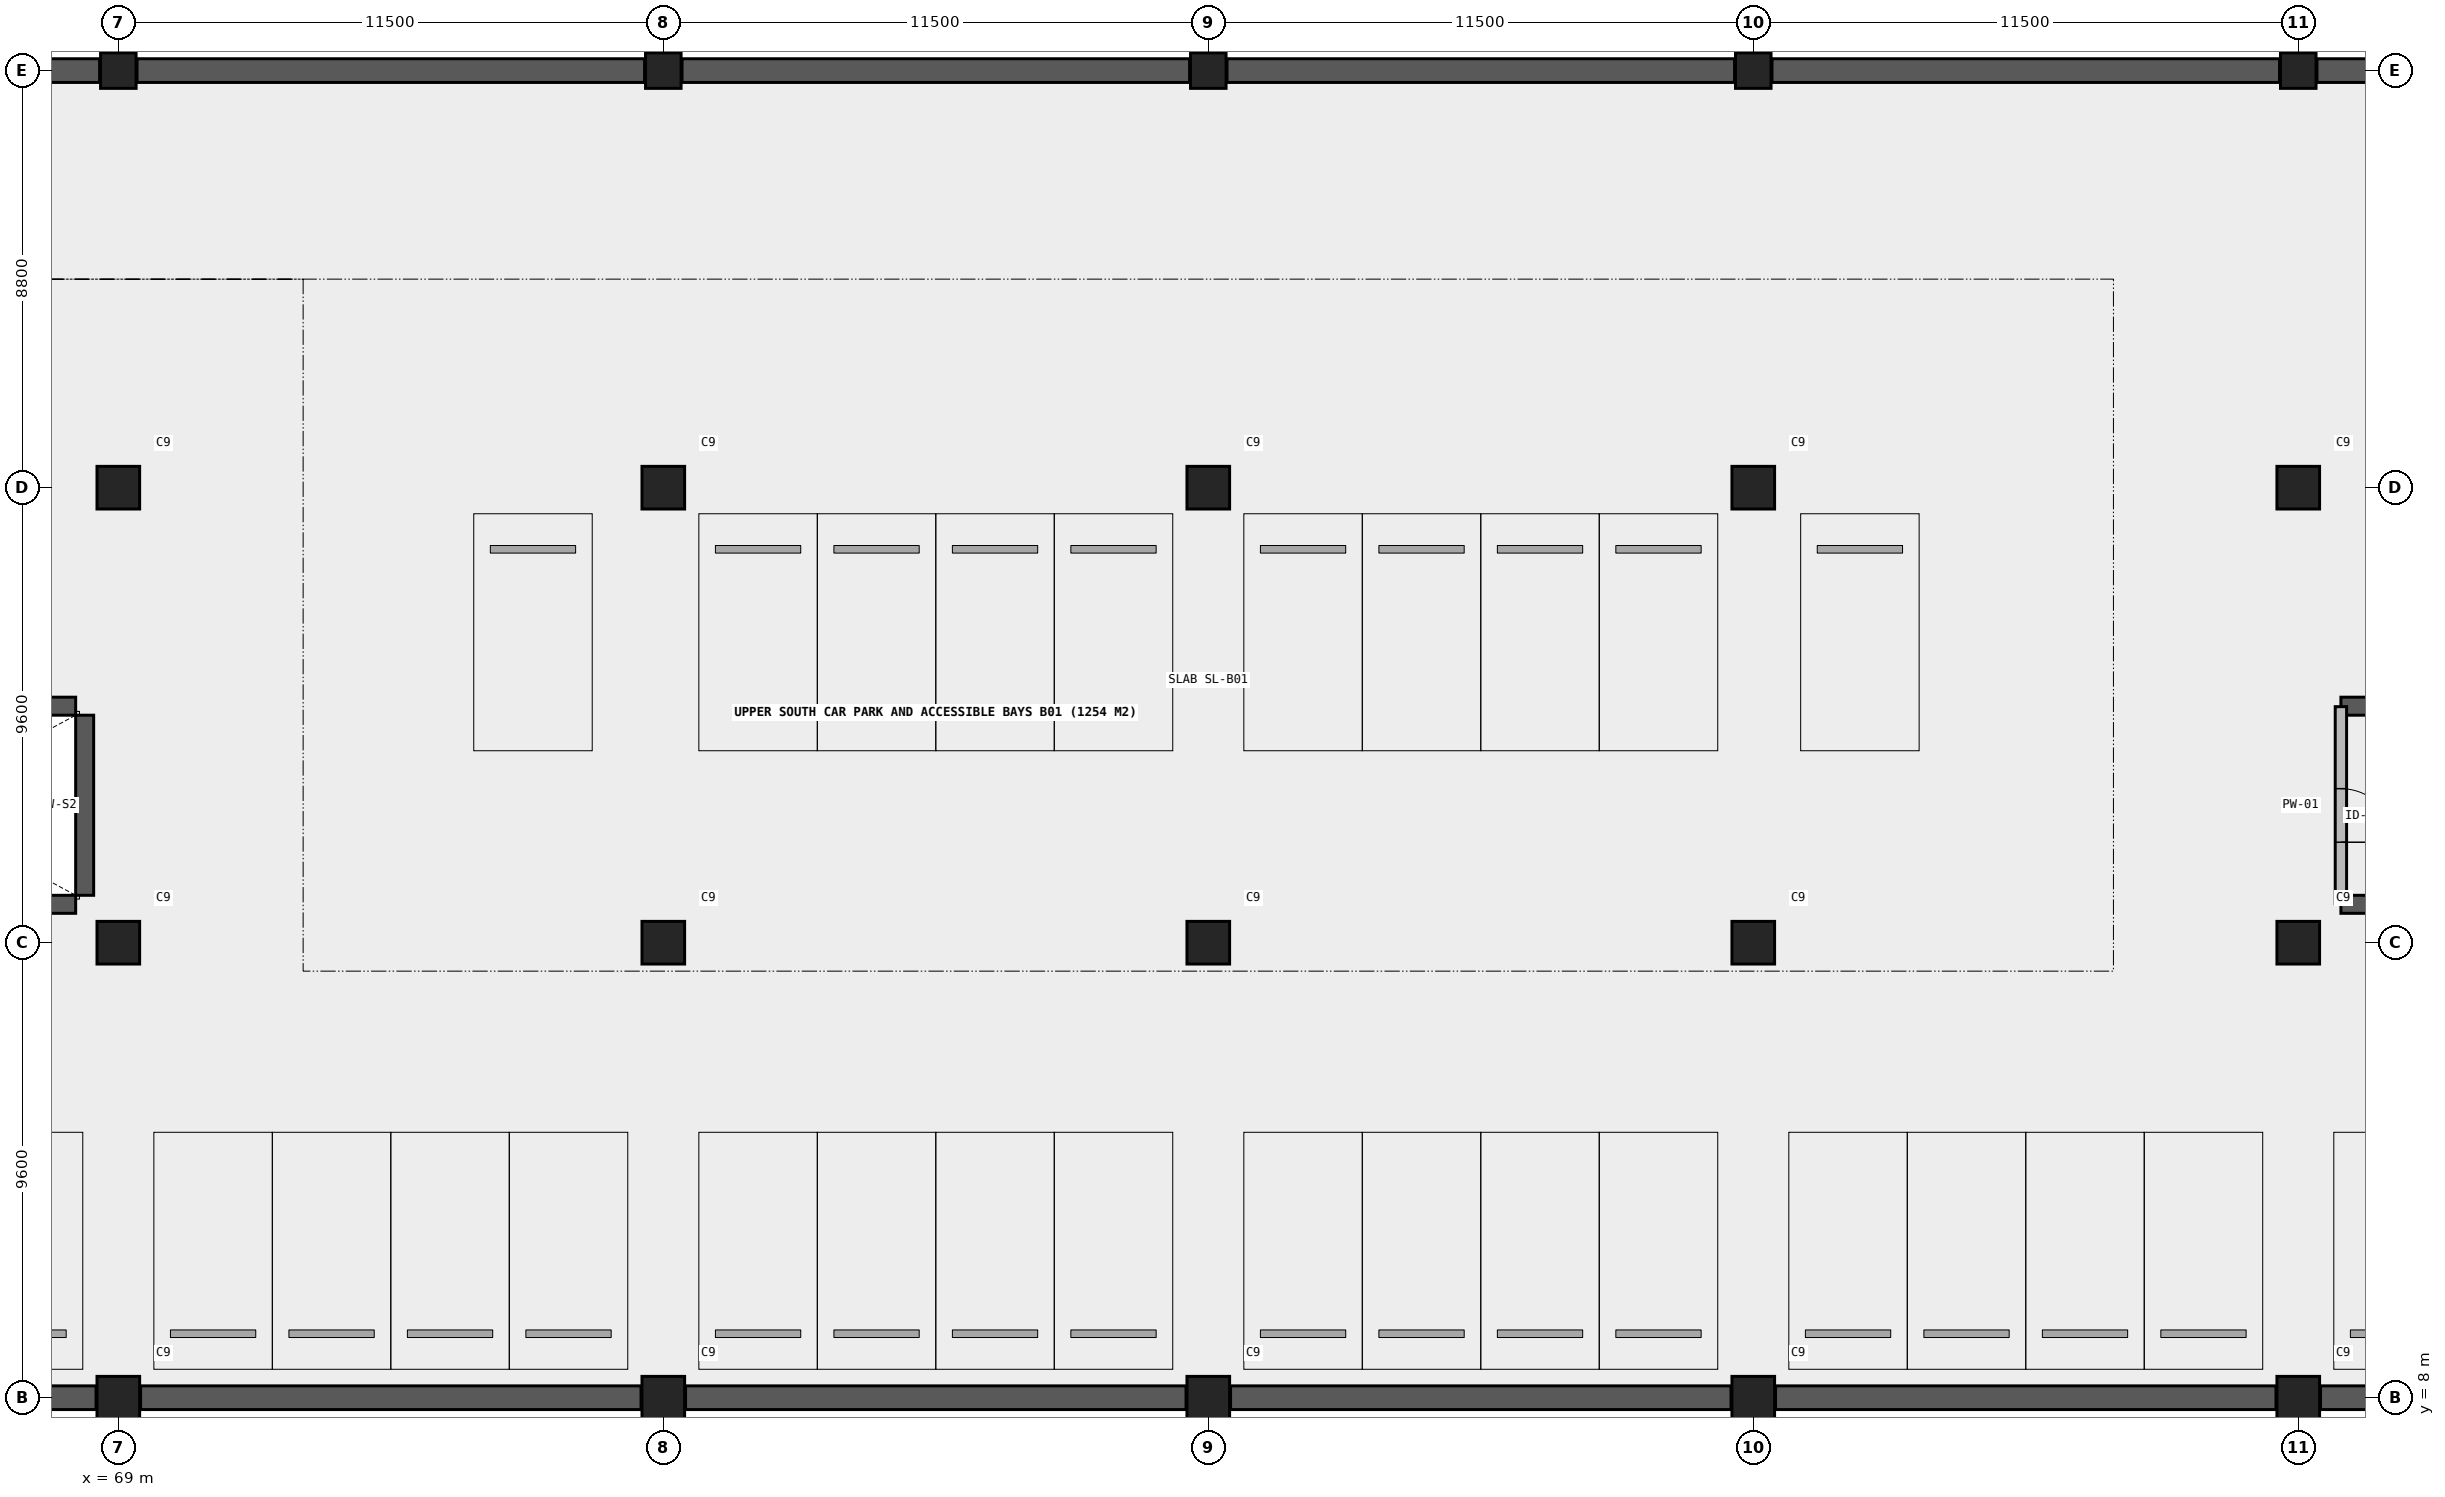
"""IFC4 building model, lengths in metres.
Left out: names, types, materials, properties, quantities, classifications, styles, units other than length and angle.
Written with IfcOpenShell. Run it as: python <this file> out.ifc"""

import sys

from ifc_helpers import new_model, si_unit, direction, frame, frame_2d, origin, origin_2d, place, context, subcontext, project, spatial, rectangle, circle, extrude, element, fill, save


model = new_model("IFC4")
c1 = context("Model", 3, precision=1e-05, world=origin(), true_north=direction((0.0, 1.0)))
c2 = subcontext(c1, "Body", "Model", "MODEL_VIEW")
j1 = project(units=[si_unit("LENGTHUNIT", "METRE"), si_unit("PLANEANGLEUNIT", "RADIAN")], contexts=[c1])
p1 = place(None, origin())
s1 = spatial("IfcSite", under=j1, at=p1, CompositionType="ELEMENT")
p2 = place(p1, origin())
s2 = spatial("IfcBuilding", under=s1, at=p2, CompositionType="ELEMENT")
p3 = place(p2, frame((0.0, 0.0, -4.2)))
s3 = spatial("IfcBuildingStorey", under=s2, at=p3, CompositionType="ELEMENT", Elevation=-4.2)
for number, where, z_axis, x_axis in (
    (1, (69.0, 8.0, 0.0), (0.0, 0.0, 1.0), (1.0, 0.0, 0.0)),
    (2, (69.0, 17.6, 0.0), (0.0, 0.0, 1.0), (1.0, 0.0, 0.0)),
    (3, (69.0, 27.2, 0.0), (0.0, 0.0, 1.0), (1.0, 0.0, 0.0)),
):
    element("IfcColumn", number, at=place(p3, frame(where, z_axis=z_axis, x_axis=x_axis)), inside=s3, PredefinedType="COLUMN", context=c2, shape_type="SweptSolid", body=[
        extrude(circle(Radius=0.45, at=origin_2d()), origin(), (0.0, 0.0, 1.0), 4.2),
    ])
p4 = place(p3, frame((69.0, 36.0, 0.0), z_axis=(0.0, 0.0, 1.0), x_axis=(1.0, 0.0, 0.0)))
e4 = element("IfcColumn", 4, at=p4, inside=s3, PredefinedType="COLUMN", context=c2, shape_type="SweptSolid", body=[
    extrude(rectangle(XDim=0.75, YDim=0.75, at=origin_2d()), origin(), (0.0, 0.0, 1.0), 4.2),
])
for number, where, z_axis, x_axis in (
    (5, (80.5, 8.0, 0.0), (0.0, 0.0, 1.0), (1.0, 0.0, 0.0)),
    (6, (80.5, 17.6, 0.0), (0.0, 0.0, 1.0), (1.0, 0.0, 0.0)),
    (7, (80.5, 27.2, 0.0), (0.0, 0.0, 1.0), (1.0, 0.0, 0.0)),
):
    element("IfcColumn", number, at=place(p3, frame(where, z_axis=z_axis, x_axis=x_axis)), inside=s3, PredefinedType="COLUMN", context=c2, shape_type="SweptSolid", body=[
        extrude(circle(Radius=0.45, at=origin_2d()), origin(), (0.0, 0.0, 1.0), 4.2),
    ])
p5 = place(p3, frame((80.5, 36.0, 0.0), z_axis=(0.0, 0.0, 1.0), x_axis=(1.0, 0.0, 0.0)))
e8 = element("IfcColumn", 8, at=p5, inside=s3, PredefinedType="COLUMN", context=c2, shape_type="SweptSolid", body=[
    extrude(rectangle(XDim=0.75, YDim=0.75, at=origin_2d()), origin(), (0.0, 0.0, 1.0), 4.2),
])
for number, where, z_axis, x_axis in (
    (9, (92.0, 8.0, 0.0), (0.0, 0.0, 1.0), (1.0, 0.0, 0.0)),
    (10, (92.0, 17.6, 0.0), (0.0, 0.0, 1.0), (1.0, 0.0, 0.0)),
    (11, (92.0, 27.2, 0.0), (0.0, 0.0, 1.0), (1.0, 0.0, 0.0)),
):
    element("IfcColumn", number, at=place(p3, frame(where, z_axis=z_axis, x_axis=x_axis)), inside=s3, PredefinedType="COLUMN", context=c2, shape_type="SweptSolid", body=[
        extrude(circle(Radius=0.45, at=origin_2d()), origin(), (0.0, 0.0, 1.0), 4.2),
    ])
p6 = place(p3, frame((92.0, 36.0, 0.0), z_axis=(0.0, 0.0, 1.0), x_axis=(1.0, 0.0, 0.0)))
e12 = element("IfcColumn", 12, at=p6, inside=s3, PredefinedType="COLUMN", context=c2, shape_type="SweptSolid", body=[
    extrude(rectangle(XDim=0.75, YDim=0.75, at=origin_2d()), origin(), (0.0, 0.0, 1.0), 4.2),
])
for number, where, z_axis, x_axis in (
    (13, (103.5, 8.0, 0.0), (0.0, 0.0, 1.0), (1.0, 0.0, 0.0)),
    (14, (103.5, 17.6, 0.0), (0.0, 0.0, 1.0), (1.0, 0.0, 0.0)),
    (15, (103.5, 27.2, 0.0), (0.0, 0.0, 1.0), (1.0, 0.0, 0.0)),
):
    element("IfcColumn", number, at=place(p3, frame(where, z_axis=z_axis, x_axis=x_axis)), inside=s3, PredefinedType="COLUMN", context=c2, shape_type="SweptSolid", body=[
        extrude(circle(Radius=0.45, at=origin_2d()), origin(), (0.0, 0.0, 1.0), 4.2),
    ])
p7 = place(p3, frame((103.5, 36.0, 0.0), z_axis=(0.0, 0.0, 1.0), x_axis=(1.0, 0.0, 0.0)))
e16 = element("IfcColumn", 16, at=p7, inside=s3, PredefinedType="COLUMN", context=c2, shape_type="SweptSolid", body=[
    extrude(rectangle(XDim=0.75, YDim=0.75, at=origin_2d()), origin(), (0.0, 0.0, 1.0), 4.2),
])
for number, where, z_axis, x_axis in (
    (17, (115.0, 8.0, 0.0), (0.0, 0.0, 1.0), (1.0, 0.0, 0.0)),
    (18, (115.0, 17.6, 0.0), (0.0, 0.0, 1.0), (1.0, 0.0, 0.0)),
    (19, (115.0, 27.2, 0.0), (0.0, 0.0, 1.0), (1.0, 0.0, 0.0)),
):
    element("IfcColumn", number, at=place(p3, frame(where, z_axis=z_axis, x_axis=x_axis)), inside=s3, PredefinedType="COLUMN", context=c2, shape_type="SweptSolid", body=[
        extrude(circle(Radius=0.45, at=origin_2d()), origin(), (0.0, 0.0, 1.0), 4.2),
    ])
p8 = place(p3, frame((115.0, 36.0, 0.0), z_axis=(0.0, 0.0, 1.0), x_axis=(1.0, 0.0, 0.0)))
e20 = element("IfcColumn", 20, at=p8, inside=s3, PredefinedType="COLUMN", context=c2, shape_type="SweptSolid", body=[
    extrude(rectangle(XDim=0.75, YDim=0.75, at=origin_2d()), origin(), (0.0, 0.0, 1.0), 4.2),
])
for number, where, z_axis, x_axis in (
    (21, (57.97, 8.0, 0.0), (0.0, 0.0, 1.0), (1.0, 0.0, 0.0)),
    (22, (69.47, 8.0, 0.0), (0.0, 0.0, 1.0), (1.0, 0.0, 0.0)),
    (23, (80.97, 8.0, 0.0), (0.0, 0.0, 1.0), (1.0, 0.0, 0.0)),
    (24, (92.47, 8.0, 0.0), (0.0, 0.0, 1.0), (1.0, 0.0, 0.0)),
    (25, (103.97, 8.0, 0.0), (0.0, 0.0, 1.0), (1.0, 0.0, 0.0)),
    (26, (115.47, 8.0, 0.0), (0.0, 0.0, 1.0), (1.0, 0.0, 0.0)),
):
    element("IfcWall", number, at=place(p3, frame(where, z_axis=z_axis, x_axis=x_axis)), inside=s3, PredefinedType="SHEAR", context=c2, shape_type="SweptSolid", body=[
        extrude(rectangle(XDim=10.56, YDim=0.5, at=frame_2d((5.28, 0.0))), origin(), (0.0, 0.0, 1.0), 4.2),
    ])
for number, where, z_axis, x_axis in (
    (27, (57.895, 36.0, 0.0), (0.0, 0.0, 1.0), (1.0, 0.0, 0.0)),
    (28, (69.395, 36.0, 0.0), (0.0, 0.0, 1.0), (1.0, 0.0, 0.0)),
    (29, (80.895, 36.0, 0.0), (0.0, 0.0, 1.0), (1.0, 0.0, 0.0)),
    (30, (92.395, 36.0, 0.0), (0.0, 0.0, 1.0), (1.0, 0.0, 0.0)),
    (31, (103.895, 36.0, 0.0), (0.0, 0.0, 1.0), (1.0, 0.0, 0.0)),
    (32, (115.395, 36.0, 0.0), (0.0, 0.0, 1.0), (1.0, 0.0, 0.0)),
):
    element("IfcWall", number, at=place(p3, frame(where, z_axis=z_axis, x_axis=x_axis)), inside=s3, PredefinedType="SHEAR", context=c2, shape_type="SweptSolid", body=[
        extrude(rectangle(XDim=10.71, YDim=0.5, at=frame_2d((5.355, 0.0))), origin(), (0.0, 0.0, 1.0), 4.2),
    ])
p9 = place(p3, frame((58.7, 18.41, 0.0), z_axis=(0.0, 0.0, 1.0), x_axis=(1.0, 0.0, 0.0)))
e33 = element("IfcWall", 33, at=p9, inside=s3, PredefinedType="SHEAR", context=c2, shape_type="SweptSolid", body=[
    extrude(rectangle(XDim=9.4, YDim=0.38, at=frame_2d((4.7, 0.0))), origin(), (0.0, 0.0, 1.0), 4.2),
])
p10 = place(p3, frame((58.7, 22.59, 0.0), z_axis=(0.0, 0.0, 1.0), x_axis=(1.0, 0.0, 0.0)))
e34 = element("IfcWall", 34, at=p10, inside=s3, PredefinedType="SHEAR", context=c2, shape_type="SweptSolid", body=[
    extrude(rectangle(XDim=9.4, YDim=0.38, at=frame_2d((4.7, 0.0))), origin(), (0.0, 0.0, 1.0), 4.2),
])
p11 = place(p10, frame((0.55, 0.0, 0.0)))
e35 = element("IfcOpeningElement", 35, at=p11, cuts=e34, PredefinedType="OPENING", context=c2, shape_type="SweptSolid", body=[
    extrude(rectangle(XDim=1.13, YDim=2.15, at=frame_2d((0.565, 1.075))), frame((0.0, 0.2, 0.0), z_axis=(0.0, -1.0, 0.0), x_axis=(1.0, 0.0, 0.0)), (0.0, 0.0, 1.0), 0.4),
])
p12 = place(p3, frame((68.29, 18.6, 0.0), z_axis=(0.0, 0.0, 1.0), x_axis=(0.0, 1.0, 0.0)))
e36 = element("IfcWall", 36, at=p12, inside=s3, PredefinedType="SHEAR", context=c2, shape_type="SweptSolid", body=[
    extrude(rectangle(XDim=3.8, YDim=0.38, at=frame_2d((1.9, 0.0))), origin(), (0.0, 0.0, 1.0), 4.2),
])
p13 = place(p3, frame((115.9, 18.41, 0.0), z_axis=(0.0, 0.0, 1.0), x_axis=(1.0, 0.0, 0.0)))
e37 = element("IfcWall", 37, at=p13, inside=s3, PredefinedType="SHEAR", context=c2, shape_type="SweptSolid", body=[
    extrude(rectangle(XDim=9.4, YDim=0.38, at=frame_2d((4.7, 0.0))), origin(), (0.0, 0.0, 1.0), 4.2),
])
p14 = place(p3, frame((115.9, 22.59, 0.0), z_axis=(0.0, 0.0, 1.0), x_axis=(1.0, 0.0, 0.0)))
e38 = element("IfcWall", 38, at=p14, inside=s3, PredefinedType="SHEAR", context=c2, shape_type="SweptSolid", body=[
    extrude(rectangle(XDim=9.4, YDim=0.38, at=frame_2d((4.7, 0.0))), origin(), (0.0, 0.0, 1.0), 4.2),
])
p15 = place(p14, frame((0.55, 0.0, 0.0)))
e39 = element("IfcOpeningElement", 39, at=p15, cuts=e38, PredefinedType="OPENING", context=c2, shape_type="SweptSolid", body=[
    extrude(rectangle(XDim=1.13, YDim=2.15, at=frame_2d((0.565, 1.075))), frame((0.0, 0.2, 0.0), z_axis=(0.0, -1.0, 0.0), x_axis=(1.0, 0.0, 0.0)), (0.0, 0.0, 1.0), 0.4),
])
p16 = place(p3, frame((115.9, 18.42, 0.0), z_axis=(0.0, 0.0, 1.0), x_axis=(0.0, 1.0, 0.0)))
e40 = element("IfcWall", 40, at=p16, inside=s3, PredefinedType="SOLIDWALL", context=c2, shape_type="SweptSolid", body=[
    extrude(rectangle(XDim=4.16, YDim=0.24, at=frame_2d((2.08, 0.0))), origin(), (0.0, 0.0, 1.0), 3.86),
])
p17 = place(p16, frame((1.3, 0.0, 0.0)))
e41 = element("IfcOpeningElement", 41, at=p17, cuts=e40, PredefinedType="OPENING", context=c2, shape_type="SweptSolid", body=[
    extrude(rectangle(XDim=1.13, YDim=2.15, at=frame_2d((0.565, 1.075))), frame((0.0, 0.13, 0.0), z_axis=(0.0, -1.0, 0.0), x_axis=(1.0, 0.0, 0.0)), (0.0, 0.0, 1.0), 0.26),
])
p18 = place(p17, frame((0.565, 0.0, 0.0), z_axis=(0.0, 0.0, 1.0), x_axis=(-1.0, 0.0, 0.0)))
e42 = element("IfcDoor", 42, at=p18, inside=s3, OperationType="SINGLE_SWING_LEFT", PredefinedType="DOOR", context=c2, shape_type="SweptSolid", body=[
    extrude(rectangle(XDim=1.13, YDim=2.15, at=frame_2d((0.0, 1.075))), frame((0.0, 0.025, 0.0), z_axis=(0.0, -1.0, 0.0), x_axis=(1.0, 0.0, 0.0)), (0.0, 0.0, 1.0), 0.05),
])
fill(e41, e42)
save(model, sys.argv[1])
